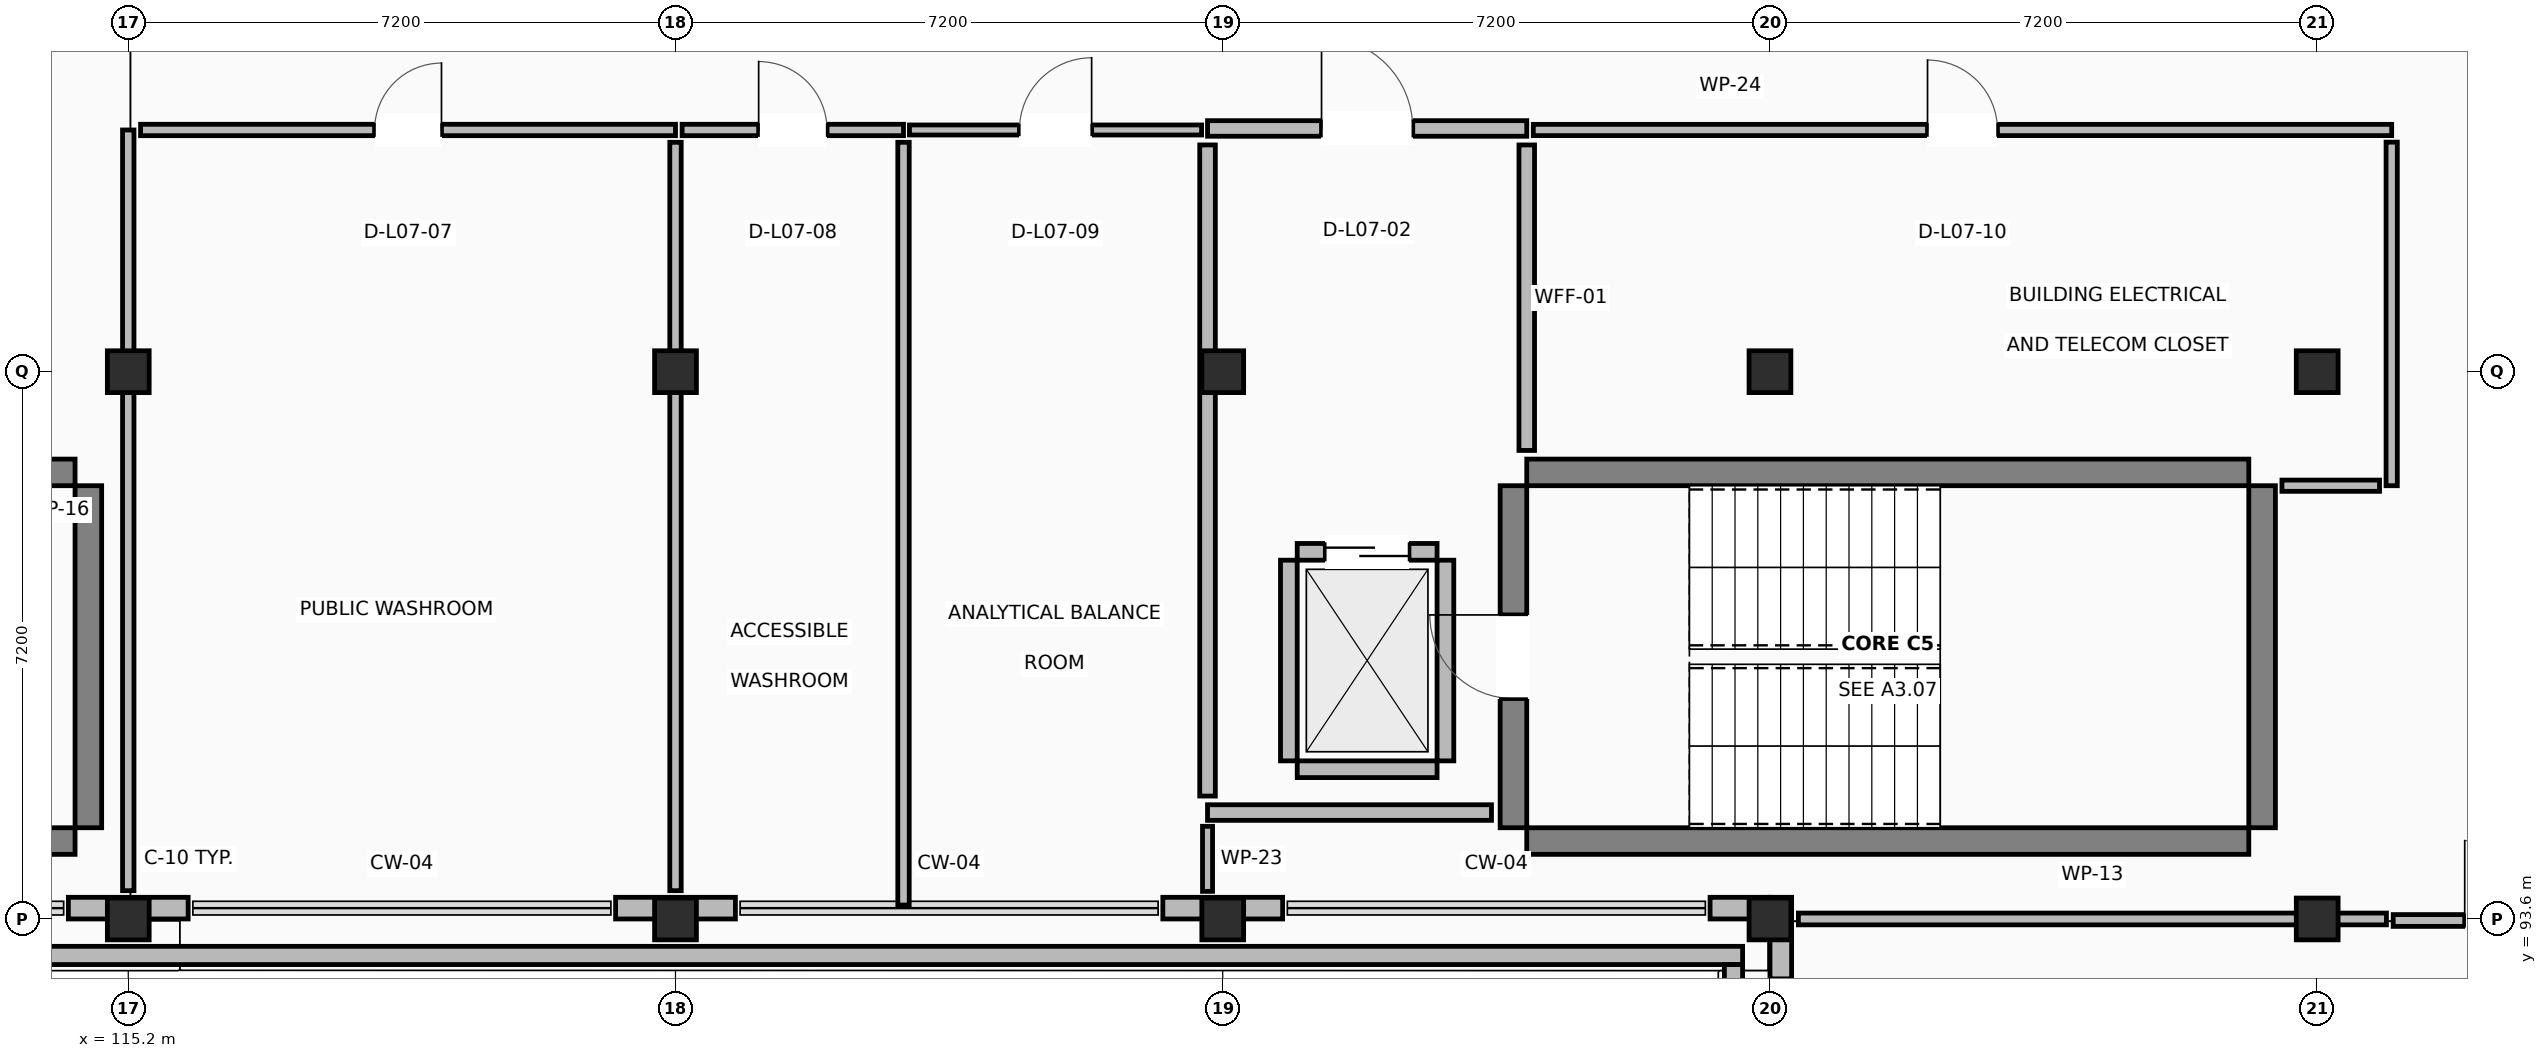
"""IFC4 building model, lengths in metres.
Left out: names, types, materials, properties, quantities, classifications, styles, units other than length and angle.
Written with IfcOpenShell. Run it as: python <this file> out.ifc"""

import sys

from ifc_helpers import new_model, si_unit, direction, frame, frame_2d, origin, origin_2d, place, context, subcontext, project, spatial, rectangle, extrude, element, fill, save


model = new_model("IFC4")
c1 = context("Model", 3, precision=1e-05, world=origin(), true_north=direction((0.0, 1.0)))
c2 = subcontext(c1, "Body", "Model", "MODEL_VIEW")
j1 = project(units=[si_unit("LENGTHUNIT", "METRE"), si_unit("PLANEANGLEUNIT", "RADIAN")], contexts=[c1])
p1 = place(None, origin())
s1 = spatial("IfcSite", under=j1, at=p1, CompositionType="ELEMENT")
p2 = place(p1, origin())
s2 = spatial("IfcBuilding", under=s1, at=p2, CompositionType="ELEMENT")
p3 = place(p2, frame((0.0, 0.0, 31.2)))
s3 = spatial("IfcBuildingStorey", under=s2, at=p3, CompositionType="ELEMENT", Elevation=31.2)
for number, where, z_axis, x_axis in (
    (1, (115.2, 93.6, 0.0), (0.0, 0.0, 1.0), (1.0, 0.0, 0.0)),
    (2, (115.2, 100.8, 0.0), (0.0, 0.0, 1.0), (1.0, 0.0, 0.0)),
    (3, (122.4, 93.6, 0.0), (0.0, 0.0, 1.0), (1.0, 0.0, 0.0)),
    (4, (122.4, 100.8, 0.0), (0.0, 0.0, 1.0), (1.0, 0.0, 0.0)),
    (5, (129.6, 93.6, 0.0), (0.0, 0.0, 1.0), (1.0, 0.0, 0.0)),
    (6, (129.6, 100.8, 0.0), (0.0, 0.0, 1.0), (1.0, 0.0, 0.0)),
    (7, (136.8, 93.6, 0.0), (0.0, 0.0, 1.0), (1.0, 0.0, 0.0)),
    (8, (136.8, 100.8, 0.0), (0.0, 0.0, 1.0), (1.0, 0.0, 0.0)),
    (9, (144.0, 93.6, 0.0), (0.0, 0.0, 1.0), (1.0, 0.0, 0.0)),
    (10, (144.0, 100.8, 0.0), (0.0, 0.0, 1.0), (1.0, 0.0, 0.0)),
):
    element("IfcColumn", number, at=place(p3, frame(where, z_axis=z_axis, x_axis=x_axis)), inside=s3, PredefinedType="COLUMN", context=c2, shape_type="SweptSolid", body=[
        extrude(rectangle(XDim=0.55, YDim=0.55, at=origin_2d()), origin(), (0.0, 0.0, 1.0), 3.92),
    ])
for number, where, z_axis, x_axis in (
    (11, (105.0, 94.625, 0.0), (0.0, 0.0, 1.0), (1.0, 0.0, 0.0)),
    (12, (105.0, 99.475, 0.0), (0.0, 0.0, 1.0), (1.0, 0.0, 0.0)),
):
    element("IfcWall", number, at=place(p3, frame(where, z_axis=z_axis, x_axis=x_axis)), inside=s3, PredefinedType="SHEAR", context=c2, shape_type="SweptSolid", body=[
        extrude(rectangle(XDim=9.5, YDim=0.35, at=frame_2d((4.75, 0.0))), origin(), (0.0, 0.0, 1.0), 3.92),
    ])
p4 = place(p3, frame((114.675, 94.8, 0.0), z_axis=(0.0, 0.0, 1.0), x_axis=(0.0, 1.0, 0.0)))
e13 = element("IfcWall", 13, at=p4, inside=s3, PredefinedType="SHEAR", context=c2, shape_type="SweptSolid", body=[
    extrude(rectangle(XDim=4.5, YDim=0.35, at=frame_2d((2.25, 0.0))), origin(), (0.0, 0.0, 1.0), 3.92),
])
for number, where, z_axis, x_axis in (
    (14, (133.6, 94.625, 0.0), (0.0, 0.0, 1.0), (1.0, 0.0, 0.0)),
    (15, (133.6, 99.475, 0.0), (0.0, 0.0, 1.0), (1.0, 0.0, 0.0)),
):
    element("IfcWall", number, at=place(p3, frame(where, z_axis=z_axis, x_axis=x_axis)), inside=s3, PredefinedType="SHEAR", context=c2, shape_type="SweptSolid", body=[
        extrude(rectangle(XDim=9.5, YDim=0.35, at=frame_2d((4.75, 0.0))), origin(), (0.0, 0.0, 1.0), 3.92),
    ])
p5 = place(p3, frame((133.425, 94.8, 0.0), z_axis=(0.0, 0.0, 1.0), x_axis=(0.0, 1.0, 0.0)))
e16 = element("IfcWall", 16, at=p5, inside=s3, PredefinedType="SHEAR", context=c2, shape_type="SweptSolid", body=[
    extrude(rectangle(XDim=4.5, YDim=0.35, at=frame_2d((2.25, 0.0))), origin(), (0.0, 0.0, 1.0), 3.92),
])
p6 = place(p5, frame((1.7, 0.0, 0.0)))
e17 = element("IfcOpeningElement", 17, at=p6, cuts=e16, PredefinedType="OPENING", context=c2, shape_type="SweptSolid", body=[
    extrude(rectangle(XDim=1.1, YDim=2.15, at=frame_2d((0.55, 1.075))), frame((0.0, 0.185, 0.0), z_axis=(0.0, -1.0, 0.0), x_axis=(1.0, 0.0, 0.0)), (0.0, 0.0, 1.0), 0.37),
])
p7 = place(p3, frame((143.275, 94.8, 0.0), z_axis=(0.0, 0.0, 1.0), x_axis=(0.0, 1.0, 0.0)))
e18 = element("IfcWall", 18, at=p7, inside=s3, PredefinedType="SHEAR", context=c2, shape_type="SweptSolid", body=[
    extrude(rectangle(XDim=4.5, YDim=0.35, at=frame_2d((2.25, 0.0))), origin(), (0.0, 0.0, 1.0), 3.92),
])
for number, where, z_axis, x_axis in (
    (19, (114.412, 93.742, 0.0), (0.0, 0.0, 1.0), (1.0, 0.0, 0.0)),
    (20, (121.612, 93.742, 0.0), (0.0, 0.0, 1.0), (1.0, 0.0, 0.0)),
    (21, (128.812, 93.742, 0.0), (0.0, 0.0, 1.0), (1.0, 0.0, 0.0)),
):
    element("IfcWall", number, at=place(p3, frame(where, z_axis=z_axis, x_axis=x_axis)), inside=s3, PredefinedType="STANDARD", context=c2, shape_type="SweptSolid", body=[
        extrude(rectangle(XDim=1.576, YDim=0.285, at=frame_2d((0.788, 0.0))), origin(), (0.0, 0.0, 1.0), 2.96),
    ])
p8 = place(p3, frame((136.012, 93.742, 0.0), z_axis=(0.0, 0.0, 1.0), x_axis=(1.0, 0.0, 0.0)))
e22 = element("IfcWall", 22, at=p8, inside=s3, PredefinedType="STANDARD", context=c2, shape_type="SweptSolid", body=[
    extrude(rectangle(XDim=0.788, YDim=0.285, at=frame_2d((0.394, 0.0))), origin(), (0.0, 0.0, 1.0), 2.96),
])
p9 = place(p3, frame((136.942, 93.885, 0.0), z_axis=(0.0, 0.0, 1.0), x_axis=(0.0, -1.0, 0.0)))
e23 = element("IfcWall", 23, at=p9, inside=s3, PredefinedType="STANDARD", context=c2, shape_type="SweptSolid", body=[
    extrude(rectangle(XDim=1.073, YDim=0.285, at=frame_2d((0.537, 0.0))), origin(), (0.0, 0.0, 1.0), 2.96),
])
p10 = place(p3, frame((136.44, 93.12, 0.0), z_axis=(0.0, 0.0, 1.0), x_axis=(-1.0, 0.0, 0.0)))
e24 = element("IfcWall", 24, at=p10, inside=s3, PredefinedType="PARAPET", context=c2, shape_type="SweptSolid", body=[
    extrude(rectangle(XDim=49.48, YDim=0.24, at=frame_2d((24.74, 0.0))), origin(), (0.0, 0.0, 1.0), 1.12),
])
p11 = place(p3, frame((136.32, 86.04, 0.0), z_axis=(0.0, 0.0, 1.0), x_axis=(0.0, 1.0, 0.0)))
e25 = element("IfcWall", 25, at=p11, inside=s3, PredefinedType="PARAPET", context=c2, shape_type="SweptSolid", body=[
    extrude(rectangle(XDim=6.96, YDim=0.24, at=frame_2d((3.48, 0.0))), origin(), (0.0, 0.0, 1.0), 1.12),
])
p12 = place(p3, frame((130.58, 95.57, 0.0), z_axis=(0.0, 0.0, 1.0), x_axis=(1.0, 0.0, 0.0)))
e26 = element("IfcWall", 26, at=p12, inside=s3, PredefinedType="STANDARD", context=c2, shape_type="SweptSolid", body=[
    extrude(rectangle(XDim=1.84, YDim=0.22, at=frame_2d((0.92, 0.0))), origin(), (0.0, 0.0, 1.0), 2.96),
])
p13 = place(p3, frame((130.58, 98.43, 0.0), z_axis=(0.0, 0.0, 1.0), x_axis=(1.0, 0.0, 0.0)))
e27 = element("IfcWall", 27, at=p13, inside=s3, PredefinedType="STANDARD", context=c2, shape_type="SweptSolid", body=[
    extrude(rectangle(XDim=1.84, YDim=0.22, at=frame_2d((0.92, 0.0))), origin(), (0.0, 0.0, 1.0), 2.96),
])
p14 = place(p13, frame((0.37, 0.0, 0.0)))
e28 = element("IfcOpeningElement", 28, at=p14, cuts=e27, PredefinedType="OPENING", context=c2, shape_type="SweptSolid", body=[
    extrude(rectangle(XDim=1.1, YDim=2.15, at=frame_2d((0.55, 1.075))), frame((0.0, 0.12, 0.0), z_axis=(0.0, -1.0, 0.0), x_axis=(1.0, 0.0, 0.0)), (0.0, 0.0, 1.0), 0.24),
])
for number, where, z_axis, x_axis in (
    (29, (130.47, 95.68, 0.0), (0.0, 0.0, 1.0), (0.0, 1.0, 0.0)),
    (30, (132.53, 95.68, 0.0), (0.0, 0.0, 1.0), (0.0, 1.0, 0.0)),
):
    element("IfcWall", number, at=place(p3, frame(where, z_axis=z_axis, x_axis=x_axis)), inside=s3, PredefinedType="STANDARD", context=c2, shape_type="SweptSolid", body=[
        extrude(rectangle(XDim=2.64, YDim=0.22, at=frame_2d((1.32, 0.0))), origin(), (0.0, 0.0, 1.0), 2.96),
    ])
p15 = place(p3, frame((129.4, 104.0, 0.0), z_axis=(0.0, 0.0, 1.0), x_axis=(1.0, 0.0, 0.0)))
e31 = element("IfcWall", 31, at=p15, inside=s3, PredefinedType="PARTITIONING", context=c2, shape_type="SweptSolid", body=[
    extrude(rectangle(XDim=4.2, YDim=0.205, at=frame_2d((2.1, 0.0))), origin(), (0.0, 0.0, 1.0), 2.96),
])
p16 = place(p15, frame((1.5, 0.0, 0.0)))
e32 = element("IfcOpeningElement", 32, at=p16, cuts=e31, PredefinedType="OPENING", context=c2, shape_type="SweptSolid", body=[
    extrude(rectangle(XDim=1.2, YDim=2.15, at=frame_2d((0.6, 1.075))), frame((0.0, 0.113, 0.0), z_axis=(0.0, -1.0, 0.0), x_axis=(1.0, 0.0, 0.0)), (0.0, 0.0, 1.0), 0.225),
])
p17 = place(p3, frame((133.6, 103.783, 0.0), z_axis=(0.0, 0.0, 1.0), x_axis=(0.0, -1.0, 0.0)))
e33 = element("IfcWall", 33, at=p17, inside=s3, PredefinedType="PARTITIONING", context=c2, shape_type="SweptSolid", body=[
    extrude(rectangle(XDim=4.019, YDim=0.205, at=frame_2d((2.01, 0.0))), origin(), (0.0, 0.0, 1.0), 2.96),
])
p18 = place(p3, frame((133.136, 95.0, 0.0), z_axis=(0.0, 0.0, 1.0), x_axis=(-1.0, 0.0, 0.0)))
e34 = element("IfcWall", 34, at=p18, inside=s3, PredefinedType="PARTITIONING", context=c2, shape_type="SweptSolid", body=[
    extrude(rectangle(XDim=3.736, YDim=0.205, at=frame_2d((1.868, 0.0))), origin(), (0.0, 0.0, 1.0), 2.96),
])
p19 = place(p3, frame((129.4, 95.217, 0.0), z_axis=(0.0, 0.0, 1.0), x_axis=(0.0, 1.0, 0.0)))
e35 = element("IfcWall", 35, at=p19, inside=s3, PredefinedType="PARTITIONING", context=c2, shape_type="SweptSolid", body=[
    extrude(rectangle(XDim=8.566, YDim=0.205, at=frame_2d((4.283, 0.0))), origin(), (0.0, 0.0, 1.0), 2.96),
])
p20 = place(p3, frame((115.2, 93.972, 0.0), z_axis=(0.0, 0.0, 1.0), x_axis=(0.0, 1.0, 0.0)))
e36 = element("IfcWall", 36, at=p20, inside=s3, PredefinedType="PARTITIONING", context=c2, shape_type="SweptSolid", body=[
    extrude(rectangle(XDim=10.008, YDim=0.15, at=frame_2d((5.004, 0.0))), origin(), (0.0, 0.0, 1.0), 2.96),
])
p21 = place(p3, frame((115.362, 103.98, 0.0), z_axis=(0.0, 0.0, 1.0), x_axis=(1.0, 0.0, 0.0)))
e37 = element("IfcWall", 37, at=p21, inside=s3, PredefinedType="PARTITIONING", context=c2, shape_type="SweptSolid", body=[
    extrude(rectangle(XDim=7.038, YDim=0.15, at=frame_2d((3.519, 0.0))), origin(), (0.0, 0.0, 1.0), 2.96),
])
p22 = place(p21, frame((3.079, 0.0, 0.0)))
e38 = element("IfcOpeningElement", 38, at=p22, cuts=e37, PredefinedType="OPENING", context=c2, shape_type="SweptSolid", body=[
    extrude(rectangle(XDim=0.88, YDim=2.1, at=frame_2d((0.44, 1.05))), frame((0.0, 0.085, 0.0), z_axis=(0.0, -1.0, 0.0), x_axis=(1.0, 0.0, 0.0)), (0.0, 0.0, 1.0), 0.17),
])
p23 = place(p3, frame((122.4, 103.818, 0.0), z_axis=(0.0, 0.0, 1.0), x_axis=(0.0, -1.0, 0.0)))
e39 = element("IfcWall", 39, at=p23, inside=s3, PredefinedType="PARTITIONING", context=c2, shape_type="SweptSolid", body=[
    extrude(rectangle(XDim=9.846, YDim=0.15, at=frame_2d((4.923, 0.0))), origin(), (0.0, 0.0, 1.0), 2.96),
])
p24 = place(p3, frame((122.487, 103.98, 0.0), z_axis=(0.0, 0.0, 1.0), x_axis=(1.0, 0.0, 0.0)))
e40 = element("IfcWall", 40, at=p24, inside=s3, PredefinedType="PARTITIONING", context=c2, shape_type="SweptSolid", body=[
    extrude(rectangle(XDim=2.913, YDim=0.15, at=frame_2d((1.457, 0.0))), origin(), (0.0, 0.0, 1.0), 2.96),
])
p25 = place(p24, frame((1.007, 0.0, 0.0)))
e41 = element("IfcOpeningElement", 41, at=p25, cuts=e40, PredefinedType="OPENING", context=c2, shape_type="SweptSolid", body=[
    extrude(rectangle(XDim=0.9, YDim=2.1, at=frame_2d((0.45, 1.05))), frame((0.0, 0.085, 0.0), z_axis=(0.0, -1.0, 0.0), x_axis=(1.0, 0.0, 0.0)), (0.0, 0.0, 1.0), 0.17),
])
p26 = place(p3, frame((125.4, 103.818, 0.0), z_axis=(0.0, 0.0, 1.0), x_axis=(0.0, -1.0, 0.0)))
e42 = element("IfcWall", 42, at=p26, inside=s3, PredefinedType="PARTITIONING", context=c2, shape_type="SweptSolid", body=[
    extrude(rectangle(XDim=10.035, YDim=0.15, at=frame_2d((5.018, 0.0))), origin(), (0.0, 0.0, 1.0), 2.96),
])
p27 = place(p3, frame((125.478, 103.98, 0.0), z_axis=(0.0, 0.0, 1.0), x_axis=(1.0, 0.0, 0.0)))
e43 = element("IfcWall", 43, at=p27, inside=s3, PredefinedType="PARTITIONING", context=c2, shape_type="SweptSolid", body=[
    extrude(rectangle(XDim=3.844, YDim=0.132, at=frame_2d((1.922, 0.0))), origin(), (0.0, 0.0, 1.0), 2.96),
])
p28 = place(p27, frame((1.447, 0.0, 0.0)))
e44 = element("IfcOpeningElement", 44, at=p28, cuts=e43, PredefinedType="OPENING", context=c2, shape_type="SweptSolid", body=[
    extrude(rectangle(XDim=0.95, YDim=2.1, at=frame_2d((0.475, 1.05))), frame((0.0, 0.076, 0.0), z_axis=(0.0, -1.0, 0.0), x_axis=(1.0, 0.0, 0.0)), (0.0, 0.0, 1.0), 0.152),
])
p29 = place(p3, frame((129.4, 94.819, 0.0), z_axis=(0.0, 0.0, 1.0), x_axis=(0.0, -1.0, 0.0)))
e45 = element("IfcWall", 45, at=p29, inside=s3, PredefinedType="PARTITIONING", context=c2, shape_type="SweptSolid", body=[
    extrude(rectangle(XDim=0.856, YDim=0.132, at=frame_2d((0.428, 0.0))), origin(), (0.0, 0.0, 1.0), 2.96),
])
p30 = place(p3, frame((133.686, 103.98, 0.0), z_axis=(0.0, 0.0, 1.0), x_axis=(1.0, 0.0, 0.0)))
e46 = element("IfcWall", 46, at=p30, inside=s3, PredefinedType="PARTITIONING", context=c2, shape_type="SweptSolid", body=[
    extrude(rectangle(XDim=11.294, YDim=0.148, at=frame_2d((5.647, 0.0))), origin(), (0.0, 0.0, 1.0), 2.96),
])
p31 = place(p30, frame((5.187, 0.0, 0.0)))
e47 = element("IfcOpeningElement", 47, at=p31, cuts=e46, PredefinedType="OPENING", context=c2, shape_type="SweptSolid", body=[
    extrude(rectangle(XDim=0.92, YDim=2.1, at=frame_2d((0.46, 1.05))), frame((0.0, 0.084, 0.0), z_axis=(0.0, -1.0, 0.0), x_axis=(1.0, 0.0, 0.0)), (0.0, 0.0, 1.0), 0.168),
])
p32 = place(p3, frame((144.98, 103.82, 0.0), z_axis=(0.0, 0.0, 1.0), x_axis=(0.0, -1.0, 0.0)))
e48 = element("IfcWall", 48, at=p32, inside=s3, PredefinedType="PARTITIONING", context=c2, shape_type="SweptSolid", body=[
    extrude(rectangle(XDim=4.52, YDim=0.148, at=frame_2d((2.26, 0.0))), origin(), (0.0, 0.0, 1.0), 2.96),
])
p33 = place(p3, frame((144.82, 99.3, 0.0), z_axis=(0.0, 0.0, 1.0), x_axis=(-1.0, 0.0, 0.0)))
e49 = element("IfcWall", 49, at=p33, inside=s3, PredefinedType="PARTITIONING", context=c2, shape_type="SweptSolid", body=[
    extrude(rectangle(XDim=1.284, YDim=0.148, at=frame_2d((0.642, 0.0))), origin(), (0.0, 0.0, 1.0), 2.96),
])
p34 = place(p3, frame((145.0, 93.58, 0.0), z_axis=(0.0, 0.0, 1.0), x_axis=(1.0, 0.0, 0.0)))
e50 = element("IfcWall", 50, at=p34, inside=s3, PredefinedType="PARTITIONING", context=c2, shape_type="SweptSolid", body=[
    extrude(rectangle(XDim=2.931, YDim=0.155, at=frame_2d((1.465, 0.0))), origin(), (0.0, 0.0, 1.0), 2.96),
])
p35 = place(p34, frame((0.941, 0.0, 0.0)))
e51 = element("IfcOpeningElement", 51, at=p35, cuts=e50, PredefinedType="OPENING", context=c2, shape_type="SweptSolid", body=[
    extrude(rectangle(XDim=1.05, YDim=2.15, at=frame_2d((0.525, 1.075))), frame((0.0, 0.087, 0.0), z_axis=(0.0, -1.0, 0.0), x_axis=(1.0, 0.0, 0.0)), (0.0, 0.0, 1.0), 0.175),
])
p36 = place(p3, frame((137.174, 93.6, 0.0), z_axis=(0.0, 0.0, 1.0), x_axis=(1.0, 0.0, 0.0)))
e52 = element("IfcWall", 52, at=p36, inside=s3, PredefinedType="PARTITIONING", context=c2, shape_type="SweptSolid", body=[
    extrude(rectangle(XDim=7.737, YDim=0.155, at=frame_2d((3.868, 0.0))), origin(), (0.0, 0.0, 1.0), 2.96),
])
p37 = place(p6, origin())
e53 = element("IfcDoor", 53, at=p37, inside=s3, OperationType="SINGLE_SWING_RIGHT", PredefinedType="DOOR", context=c2, shape_type="SweptSolid", body=[
    extrude(rectangle(XDim=1.1, YDim=2.15, at=frame_2d((0.55, 1.075))), frame((0.0, 0.025, 0.0), z_axis=(0.0, -1.0, 0.0), x_axis=(1.0, 0.0, 0.0)), (0.0, 0.0, 1.0), 0.05),
])
fill(e17, e53)
p38 = place(p14, origin())
e54 = element("IfcDoor", 54, at=p38, inside=s3, OperationType="SLIDING_TO_RIGHT", PredefinedType="DOOR", context=c2, shape_type="SweptSolid", body=[
    extrude(rectangle(XDim=1.1, YDim=2.15, at=frame_2d((0.55, 1.075))), frame((0.0, 0.025, 0.0), z_axis=(0.0, -1.0, 0.0), x_axis=(1.0, 0.0, 0.0)), (0.0, 0.0, 1.0), 0.05),
])
fill(e28, e54)
p39 = place(p16, origin())
e55 = element("IfcDoor", 55, at=p39, inside=s3, OperationType="SINGLE_SWING_LEFT", PredefinedType="DOOR", context=c2, shape_type="SweptSolid", body=[
    extrude(rectangle(XDim=1.2, YDim=2.15, at=frame_2d((0.6, 1.075))), frame((0.0, 0.025, 0.0), z_axis=(0.0, -1.0, 0.0), x_axis=(1.0, 0.0, 0.0)), (0.0, 0.0, 1.0), 0.05),
])
fill(e32, e55)
p40 = place(p22, origin())
e56 = element("IfcDoor", 56, at=p40, inside=s3, OperationType="SINGLE_SWING_RIGHT", PredefinedType="DOOR", context=c2, shape_type="SweptSolid", body=[
    extrude(rectangle(XDim=0.88, YDim=2.1, at=frame_2d((0.44, 1.05))), frame((0.0, 0.025, 0.0), z_axis=(0.0, -1.0, 0.0), x_axis=(1.0, 0.0, 0.0)), (0.0, 0.0, 1.0), 0.05),
])
fill(e38, e56)
p41 = place(p25, origin())
e57 = element("IfcDoor", 57, at=p41, inside=s3, OperationType="SINGLE_SWING_LEFT", PredefinedType="DOOR", context=c2, shape_type="SweptSolid", body=[
    extrude(rectangle(XDim=0.9, YDim=2.1, at=frame_2d((0.45, 1.05))), frame((0.0, 0.025, 0.0), z_axis=(0.0, -1.0, 0.0), x_axis=(1.0, 0.0, 0.0)), (0.0, 0.0, 1.0), 0.05),
])
fill(e41, e57)
p42 = place(p28, origin())
e58 = element("IfcDoor", 58, at=p42, inside=s3, OperationType="SINGLE_SWING_RIGHT", PredefinedType="DOOR", context=c2, shape_type="SweptSolid", body=[
    extrude(rectangle(XDim=0.95, YDim=2.1, at=frame_2d((0.475, 1.05))), frame((0.0, 0.025, 0.0), z_axis=(0.0, -1.0, 0.0), x_axis=(1.0, 0.0, 0.0)), (0.0, 0.0, 1.0), 0.05),
])
fill(e44, e58)
p43 = place(p31, origin())
e59 = element("IfcDoor", 59, at=p43, inside=s3, OperationType="SINGLE_SWING_LEFT", PredefinedType="DOOR", context=c2, shape_type="SweptSolid", body=[
    extrude(rectangle(XDim=0.92, YDim=2.1, at=frame_2d((0.46, 1.05))), frame((0.0, 0.025, 0.0), z_axis=(0.0, -1.0, 0.0), x_axis=(1.0, 0.0, 0.0)), (0.0, 0.0, 1.0), 0.05),
])
fill(e47, e59)
p44 = place(p35, origin())
e60 = element("IfcDoor", 60, at=p44, inside=s3, OperationType="SINGLE_SWING_LEFT", PredefinedType="DOOR", context=c2, shape_type="SweptSolid", body=[
    extrude(rectangle(XDim=1.05, YDim=2.15, at=frame_2d((0.525, 1.075))), frame((0.0, 0.025, 0.0), z_axis=(0.0, -1.0, 0.0), x_axis=(1.0, 0.0, 0.0)), (0.0, 0.0, 1.0), 0.05),
])
fill(e51, e60)
save(model, sys.argv[1])
